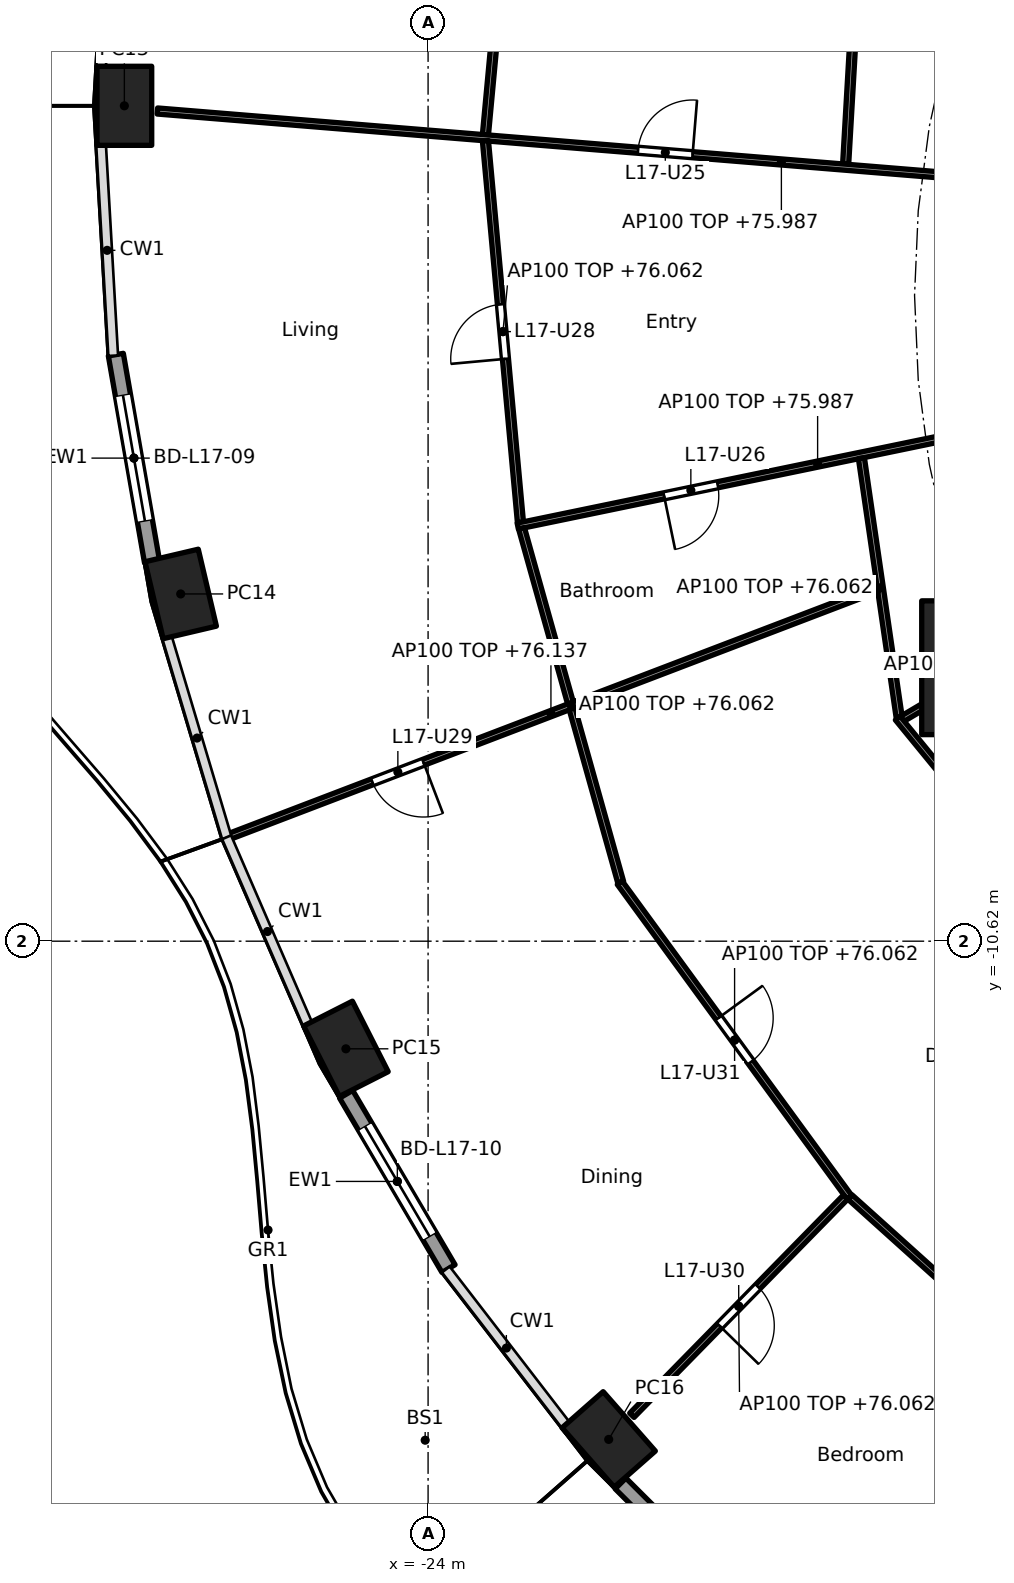
"""IFC4 building model, lengths in metres.
Left out: names, types, materials, properties, quantities, classifications, styles, units other than length and angle.
Written with IfcOpenShell. Run it as: python <this file> out.ifc"""

import sys

from ifc_helpers import new_model, si_unit, direction, frame, frame_2d, origin, origin_2d, place, context, subcontext, project, spatial, rectangle, hollow_rectangle, extrude, element, fill, save


model = new_model("IFC4")
c1 = context("Model", 3, precision=1e-05, world=origin(), true_north=direction((0.0, 1.0)))
c2 = subcontext(c1, "Body", "Model", "MODEL_VIEW")
j1 = project(units=[si_unit("LENGTHUNIT", "METRE"), si_unit("PLANEANGLEUNIT", "RADIAN")], contexts=[c1])
p1 = place(None, origin())
s1 = spatial("IfcSite", under=j1, at=p1, CompositionType="ELEMENT")
p2 = place(p1, origin())
s2 = spatial("IfcBuilding", under=s1, at=p2, CompositionType="ELEMENT")
p3 = place(p2, frame((0.0, 0.0, 73.3)))
s3 = spatial("IfcBuildingStorey", under=s2, at=p3, CompositionType="ELEMENT", Elevation=73.3)
for number, where, z_axis, x_axis in (
    (1, (-28.995, 3.118, -0.26), (0.0, 0.0, 1.0), (0.0, -1.0, 0.0)),
    (2, (-28.068, -4.91, -0.26), (0.0, 0.0, 1.0), (0.229, -0.973, 0.0)),
    (3, (-25.352, -12.39, -0.26), (0.0, 0.0, 1.0), (0.452, -0.892, 0.0)),
    (4, (-21.03, -18.813, -0.26), (0.0, 0.0, 1.0), (0.66, -0.751, 0.0)),
):
    element("IfcColumn", number, at=place(p3, frame(where, z_axis=z_axis, x_axis=x_axis)), inside=s3, PredefinedType="COLUMN", context=c2, shape_type="SweptSolid", body=[
        extrude(hollow_rectangle(XDim=1.3, YDim=0.9, WallThickness=0.045, at=origin_2d()), origin(), (0.0, 0.0, 1.0), 3.96),
    ])
p4 = place(p3, frame((-14.782, -6.123, 0.0), z_axis=(0.0, 0.0, 1.0), x_axis=(1.0, 0.0, 0.0)))
e5 = element("IfcColumn", 5, at=p4, inside=s3, PredefinedType="COLUMN", context=c2, shape_type="SweptSolid", body=[
    extrude(rectangle(XDim=2.2, YDim=2.2, at=origin_2d()), origin(), (0.0, 0.0, 1.0), 3.7),
])
p5 = place(p3, frame((-28.54, -4.377, 0.0), z_axis=(0.0, 0.0, 1.0), x_axis=(-0.17223289558, 0.985056257114, 0.0)))
e6 = element("IfcWall", 6, at=p5, inside=s3, PredefinedType="SOLIDWALL", context=c2, shape_type="SweptSolid", body=[
    extrude(rectangle(XDim=3.454, YDim=0.25, at=frame_2d((1.727, 0.0))), origin(), (0.0, 0.0, 1.0), 3.44),
])
p6 = place(p5, frame((0.677, 0.0, 0.0)))
e7 = element("IfcOpeningElement", 7, at=p6, cuts=e6, PredefinedType="OPENING", context=c2, shape_type="SweptSolid", body=[
    extrude(rectangle(XDim=2.1, YDim=2.4, at=frame_2d((1.05, 1.2))), frame((0.0, 0.135, 0.0), z_axis=(0.0, -1.0, 0.0), x_axis=(1.0, 0.0, 0.0)), (0.0, 0.0, 1.0), 0.27),
])
p7 = place(p3, frame((-23.664, -16.004, 0.0), z_axis=(0.0, 0.0, 1.0), x_axis=(-0.506352525095, 0.86232657406, 0.0)))
e8 = element("IfcWall", 8, at=p7, inside=s3, PredefinedType="SOLIDWALL", context=c2, shape_type="SweptSolid", body=[
    extrude(rectangle(XDim=3.325, YDim=0.25, at=frame_2d((1.663, 0.0))), origin(), (0.0, 0.0, 1.0), 3.44),
])
p8 = place(p7, frame((0.612, 0.0, 0.0)))
e9 = element("IfcOpeningElement", 9, at=p8, cuts=e8, PredefinedType="OPENING", context=c2, shape_type="SweptSolid", body=[
    extrude(rectangle(XDim=2.1, YDim=2.4, at=frame_2d((1.05, 1.2))), frame((0.0, 0.135, 0.0), z_axis=(0.0, -1.0, 0.0), x_axis=(1.0, 0.0, 0.0)), (0.0, 0.0, 1.0), 0.27),
])
p9 = place(p3, frame((-18.571, -21.796, 0.0), z_axis=(0.0, 0.0, 1.0), x_axis=(-0.707831646613, 0.706381171927, 0.0)))
e10 = element("IfcWall", 10, at=p9, inside=s3, PredefinedType="SOLIDWALL", context=c2, shape_type="SweptSolid", body=[
    extrude(rectangle(XDim=3.198, YDim=0.25, at=frame_2d((1.599, 0.0))), origin(), (0.0, 0.0, 1.0), 3.44),
])
p10 = place(p9, frame((0.549, 0.0, 0.0)))
e11 = element("IfcOpeningElement", 11, at=p10, cuts=e10, PredefinedType="OPENING", context=c2, shape_type="SweptSolid", body=[
    extrude(rectangle(XDim=2.1, YDim=2.4, at=frame_2d((1.05, 1.2))), frame((0.0, 0.135, 0.0), z_axis=(0.0, -1.0, 0.0), x_axis=(1.0, 0.0, 0.0)), (0.0, 0.0, 1.0), 0.27),
])
p11 = place(p3, frame((-16.865, 6.8, 0.0), z_axis=(0.0, 0.0, 1.0), x_axis=(-0.057758567218, -0.998330580476, 0.0)))
e12 = element("IfcWall", 12, at=p11, inside=s3, PredefinedType="PARTITIONING", context=c2, shape_type="SweptSolid", body=[
    extrude(rectangle(XDim=4.65, YDim=0.1, at=frame_2d((2.325, 0.0))), origin(), (0.0, 0.0, 1.0), 2.762),
])
p12 = place(p3, frame((-22.474, 8.898, 0.0), z_axis=(0.0, 0.0, 1.0), x_axis=(-0.092756864489, -0.995688788774, 0.0)))
e13 = element("IfcWall", 13, at=p12, inside=s3, PredefinedType="PARTITIONING", context=c2, shape_type="SweptSolid", body=[
    extrude(rectangle(XDim=6.283, YDim=0.1, at=frame_2d((3.141, 0.0))), origin(), (0.0, 0.0, 1.0), 2.762),
])
p13 = place(p12, frame((2.691, 0.0, 0.0)))
e14 = element("IfcOpeningElement", 14, at=p13, cuts=e13, PredefinedType="OPENING", context=c2, shape_type="SweptSolid", body=[
    extrude(rectangle(XDim=0.9, YDim=2.1, at=frame_2d((0.45, 1.05))), frame((0.0, 0.06, 0.0), z_axis=(0.0, -1.0, 0.0), x_axis=(1.0, 0.0, 0.0)), (0.0, 0.0, 1.0), 0.12),
])
p14 = place(p3, frame((-12.665, 1.743, 0.0), z_axis=(0.0, 0.0, 1.0), x_axis=(-0.996680482238, 0.081412630013, 0.0)))
e15 = element("IfcWall", 15, at=p14, inside=s3, PredefinedType="PARTITIONING", context=c2, shape_type="SweptSolid", body=[
    extrude(rectangle(XDim=15.84, YDim=0.1, at=frame_2d((7.92, 0.0))), origin(), (0.0, 0.0, 1.0), 2.687),
])
p15 = place(p14, frame((1.793, 0.0, 0.0)))
e16 = element("IfcOpeningElement", 16, at=p15, cuts=e15, PredefinedType="OPENING", context=c2, shape_type="SweptSolid", body=[
    extrude(rectangle(XDim=0.9, YDim=2.1, at=frame_2d((0.45, 1.05))), frame((0.0, 0.06, 0.0), z_axis=(0.0, -1.0, 0.0), x_axis=(1.0, 0.0, 0.0)), (0.0, 0.0, 1.0), 0.12),
])
p16 = place(p14, frame((7.009, 0.0, 0.0)))
e17 = element("IfcOpeningElement", 17, at=p16, cuts=e15, PredefinedType="OPENING", context=c2, shape_type="SweptSolid", body=[
    extrude(rectangle(XDim=0.9, YDim=2.1, at=frame_2d((0.45, 1.05))), frame((0.0, 0.06, 0.0), z_axis=(0.0, -1.0, 0.0), x_axis=(1.0, 0.0, 0.0)), (0.0, 0.0, 1.0), 0.12),
])
p17 = place(p3, frame((-23.057, 2.542, 0.0), z_axis=(0.0, 0.0, 1.0), x_axis=(0.091380945427, -0.995816008514, 0.0)))
e18 = element("IfcWall", 18, at=p17, inside=s3, PredefinedType="PARTITIONING", context=c2, shape_type="SweptSolid", body=[
    extrude(rectangle(XDim=6.302, YDim=0.1, at=frame_2d((3.151, 0.0))), origin(), (0.0, 0.0, 1.0), 2.762),
])
p18 = place(p17, frame((2.701, 0.0, 0.0)))
e19 = element("IfcOpeningElement", 19, at=p18, cuts=e18, PredefinedType="OPENING", context=c2, shape_type="SweptSolid", body=[
    extrude(rectangle(XDim=0.9, YDim=2.1, at=frame_2d((0.45, 1.05))), frame((0.0, 0.06, 0.0), z_axis=(0.0, -1.0, 0.0), x_axis=(1.0, 0.0, 0.0)), (0.0, 0.0, 1.0), 0.12),
])
p19 = place(p3, frame((-12.663, -1.755, 0.0), z_axis=(0.0, 0.0, 1.0), x_axis=(-0.979304677471, -0.202391572657, 0.0)))
e20 = element("IfcWall", 20, at=p19, inside=s3, PredefinedType="PARTITIONING", context=c2, shape_type="SweptSolid", body=[
    extrude(rectangle(XDim=10.071, YDim=0.1, at=frame_2d((5.036, 0.0))), origin(), (0.0, 0.0, 1.0), 2.687),
])
p20 = place(p19, frame((1.704, 0.0, 0.0)))
e21 = element("IfcOpeningElement", 21, at=p20, cuts=e20, PredefinedType="OPENING", context=c2, shape_type="SweptSolid", body=[
    extrude(rectangle(XDim=0.9, YDim=2.1, at=frame_2d((0.45, 1.05))), frame((0.0, 0.06, 0.0), z_axis=(0.0, -1.0, 0.0), x_axis=(1.0, 0.0, 0.0)), (0.0, 0.0, 1.0), 0.12),
])
p21 = place(p19, frame((6.714, 0.0, 0.0)))
e22 = element("IfcOpeningElement", 22, at=p21, cuts=e20, PredefinedType="OPENING", context=c2, shape_type="SweptSolid", body=[
    extrude(rectangle(XDim=0.9, YDim=2.1, at=frame_2d((0.45, 1.05))), frame((0.0, 0.06, 0.0), z_axis=(0.0, -1.0, 0.0), x_axis=(1.0, 0.0, 0.0)), (0.0, 0.0, 1.0), 0.12),
])
p22 = place(p3, frame((-16.874, -2.677, 0.0), z_axis=(0.0, 0.0, 1.0), x_axis=(0.144260658133, -0.989539722555, 0.0)))
e23 = element("IfcWall", 23, at=p22, inside=s3, PredefinedType="PARTITIONING", context=c2, shape_type="SweptSolid", body=[
    extrude(rectangle(XDim=4.309, YDim=0.1, at=frame_2d((2.154, 0.0))), origin(), (0.0, 0.0, 1.0), 2.762),
])
p23 = place(p3, frame((-22.463, -3.832, 0.0), z_axis=(0.0, 0.0, 1.0), x_axis=(0.269797759333, -0.962917010473, 0.0)))
e24 = element("IfcWall", 24, at=p23, inside=s3, PredefinedType="PARTITIONING", context=c2, shape_type="SweptSolid", body=[
    extrude(rectangle(XDim=6.043, YDim=0.1, at=frame_2d((3.021, 0.0))), origin(), (0.0, 0.0, 1.0), 2.762),
])
p24 = place(p3, frame((-16.61, -4.826, 0.0), z_axis=(0.0, 0.0, 1.0), x_axis=(-0.934174502909, -0.356816476798, 0.0)))
e25 = element("IfcWall", 25, at=p24, inside=s3, PredefinedType="PARTITIONING", context=c2, shape_type="SweptSolid", body=[
    extrude(rectangle(XDim=11.496, YDim=0.1, at=frame_2d((5.748, 0.0))), origin(), (0.0, 0.0, 1.0), 2.837),
])
p25 = place(p24, frame((7.993, 0.0, 0.0)))
e26 = element("IfcOpeningElement", 26, at=p25, cuts=e25, PredefinedType="OPENING", context=c2, shape_type="SweptSolid", body=[
    extrude(rectangle(XDim=0.9, YDim=2.1, at=frame_2d((0.45, 1.05))), frame((0.0, 0.06, 0.0), z_axis=(0.0, -1.0, 0.0), x_axis=(1.0, 0.0, 0.0)), (0.0, 0.0, 1.0), 0.12),
])
p26 = place(p3, frame((-14.825, -6.148, 0.0), z_axis=(0.0, 0.0, 1.0), x_axis=(-0.860452514841, -0.509530636669, 0.0)))
e27 = element("IfcWall", 27, at=p26, inside=s3, PredefinedType="PARTITIONING", context=c2, shape_type="SweptSolid", body=[
    extrude(rectangle(XDim=1.601, YDim=0.1, at=frame_2d((0.8, 0.0))), origin(), (0.0, 0.0, 1.0), 3.44),
])
p27 = place(p3, frame((-16.277, -6.951, 0.0), z_axis=(0.0, 0.0, 1.0), x_axis=(0.633427340372, -0.773802173988, 0.0)))
e28 = element("IfcWall", 28, at=p27, inside=s3, PredefinedType="PARTITIONING", context=c2, shape_type="SweptSolid", body=[
    extrude(rectangle(XDim=4.979, YDim=0.1, at=frame_2d((2.49, 0.0))), origin(), (0.0, 0.0, 1.0), 2.762),
])
p28 = place(p3, frame((-20.848, -9.658, 0.0), z_axis=(0.0, 0.0, 1.0), x_axis=(0.5895799361, -0.807710033953, 0.0)))
e29 = element("IfcWall", 29, at=p28, inside=s3, PredefinedType="PARTITIONING", context=c2, shape_type="SweptSolid", body=[
    extrude(rectangle(XDim=6.408, YDim=0.1, at=frame_2d((3.204, 0.0))), origin(), (0.0, 0.0, 1.0), 2.762),
])
p29 = place(p28, frame((2.754, 0.0, 0.0)))
e30 = element("IfcOpeningElement", 30, at=p29, cuts=e29, PredefinedType="OPENING", context=c2, shape_type="SweptSolid", body=[
    extrude(rectangle(XDim=0.9, YDim=2.1, at=frame_2d((0.45, 1.05))), frame((0.0, 0.06, 0.0), z_axis=(0.0, -1.0, 0.0), x_axis=(1.0, 0.0, 0.0)), (0.0, 0.0, 1.0), 0.12),
])
p30 = place(p3, frame((-17.135, -14.829, 0.0), z_axis=(0.0, 0.0, 1.0), x_axis=(-0.699702869429, -0.714433967917, 0.0)))
e31 = element("IfcWall", 31, at=p30, inside=s3, PredefinedType="PARTITIONING", context=c2, shape_type="SweptSolid", body=[
    extrude(rectangle(XDim=5.022, YDim=0.1, at=frame_2d((2.511, 0.0))), origin(), (0.0, 0.0, 1.0), 2.762),
])
p31 = place(p30, frame((2.061, 0.0, 0.0)))
e32 = element("IfcOpeningElement", 32, at=p31, cuts=e31, PredefinedType="OPENING", context=c2, shape_type="SweptSolid", body=[
    extrude(rectangle(XDim=0.9, YDim=2.1, at=frame_2d((0.45, 1.05))), frame((0.0, 0.06, 0.0), z_axis=(0.0, -1.0, 0.0), x_axis=(1.0, 0.0, 0.0)), (0.0, 0.0, 1.0), 0.12),
])
p32 = place(p3, frame((-17.063, -14.827, 0.0), z_axis=(0.0, 0.0, 1.0), x_axis=(0.743478142868, -0.668760234373, 0.0)))
e33 = element("IfcWall", 33, at=p32, inside=s3, PredefinedType="PARTITIONING", context=c2, shape_type="SweptSolid", body=[
    extrude(rectangle(XDim=5.937, YDim=0.1, at=frame_2d((2.969, 0.0))), origin(), (0.0, 0.0, 1.0), 2.762),
])
p33 = place(p6, origin())
e34 = element("IfcDoor", 34, at=p33, inside=s3, OperationType="SLIDING_TO_LEFT", PredefinedType="DOOR", context=c2, shape_type="SweptSolid", body=[
    extrude(rectangle(XDim=2.1, YDim=2.4, at=frame_2d((1.05, 1.2))), frame((0.0, 0.025, 0.0), z_axis=(0.0, -1.0, 0.0), x_axis=(1.0, 0.0, 0.0)), (0.0, 0.0, 1.0), 0.05),
])
fill(e7, e34)
p34 = place(p8, origin())
e35 = element("IfcDoor", 35, at=p34, inside=s3, OperationType="SLIDING_TO_LEFT", PredefinedType="DOOR", context=c2, shape_type="SweptSolid", body=[
    extrude(rectangle(XDim=2.1, YDim=2.4, at=frame_2d((1.05, 1.2))), frame((0.0, 0.025, 0.0), z_axis=(0.0, -1.0, 0.0), x_axis=(1.0, 0.0, 0.0)), (0.0, 0.0, 1.0), 0.05),
])
fill(e9, e35)
p35 = place(p16, frame((0.9, 0.0, 0.0), x_axis=(-1.0, 0.0, 0.0)))
e36 = element("IfcDoor", 36, at=p35, inside=s3, OperationType="SINGLE_SWING_RIGHT", PredefinedType="DOOR", context=c2, shape_type="SweptSolid", body=[
    extrude(rectangle(XDim=0.9, YDim=2.1, at=frame_2d((0.45, 1.05))), frame((0.0, 0.025, 0.0), z_axis=(0.0, -1.0, 0.0), x_axis=(1.0, 0.0, 0.0)), (0.0, 0.0, 1.0), 0.05),
])
fill(e17, e36)
p36 = place(p21, origin())
e37 = element("IfcDoor", 37, at=p36, inside=s3, OperationType="SINGLE_SWING_RIGHT", PredefinedType="DOOR", context=c2, shape_type="SweptSolid", body=[
    extrude(rectangle(XDim=0.9, YDim=2.1, at=frame_2d((0.45, 1.05))), frame((0.0, 0.025, 0.0), z_axis=(0.0, -1.0, 0.0), x_axis=(1.0, 0.0, 0.0)), (0.0, 0.0, 1.0), 0.05),
])
fill(e22, e37)
p37 = place(p18, frame((0.9, 0.0, 0.0), x_axis=(-1.0, 0.0, 0.0)))
e38 = element("IfcDoor", 38, at=p37, inside=s3, OperationType="SINGLE_SWING_LEFT", PredefinedType="DOOR", context=c2, shape_type="SweptSolid", body=[
    extrude(rectangle(XDim=0.9, YDim=2.1, at=frame_2d((0.45, 1.05))), frame((0.0, 0.025, 0.0), z_axis=(0.0, -1.0, 0.0), x_axis=(1.0, 0.0, 0.0)), (0.0, 0.0, 1.0), 0.05),
])
fill(e19, e38)
p38 = place(p25, origin())
e39 = element("IfcDoor", 39, at=p38, inside=s3, OperationType="SINGLE_SWING_LEFT", PredefinedType="DOOR", context=c2, shape_type="SweptSolid", body=[
    extrude(rectangle(XDim=0.9, YDim=2.1, at=frame_2d((0.45, 1.05))), frame((0.0, 0.025, 0.0), z_axis=(0.0, -1.0, 0.0), x_axis=(1.0, 0.0, 0.0)), (0.0, 0.0, 1.0), 0.05),
])
fill(e26, e39)
p39 = place(p31, origin())
e40 = element("IfcDoor", 40, at=p39, inside=s3, OperationType="SINGLE_SWING_RIGHT", PredefinedType="DOOR", context=c2, shape_type="SweptSolid", body=[
    extrude(rectangle(XDim=0.9, YDim=2.1, at=frame_2d((0.45, 1.05))), frame((0.0, 0.025, 0.0), z_axis=(0.0, -1.0, 0.0), x_axis=(1.0, 0.0, 0.0)), (0.0, 0.0, 1.0), 0.05),
])
fill(e32, e40)
p40 = place(p29, origin())
e41 = element("IfcDoor", 41, at=p40, inside=s3, OperationType="SINGLE_SWING_LEFT", PredefinedType="DOOR", context=c2, shape_type="SweptSolid", body=[
    extrude(rectangle(XDim=0.9, YDim=2.1, at=frame_2d((0.45, 1.05))), frame((0.0, 0.025, 0.0), z_axis=(0.0, -1.0, 0.0), x_axis=(1.0, 0.0, 0.0)), (0.0, 0.0, 1.0), 0.05),
])
fill(e30, e41)
save(model, sys.argv[1])
